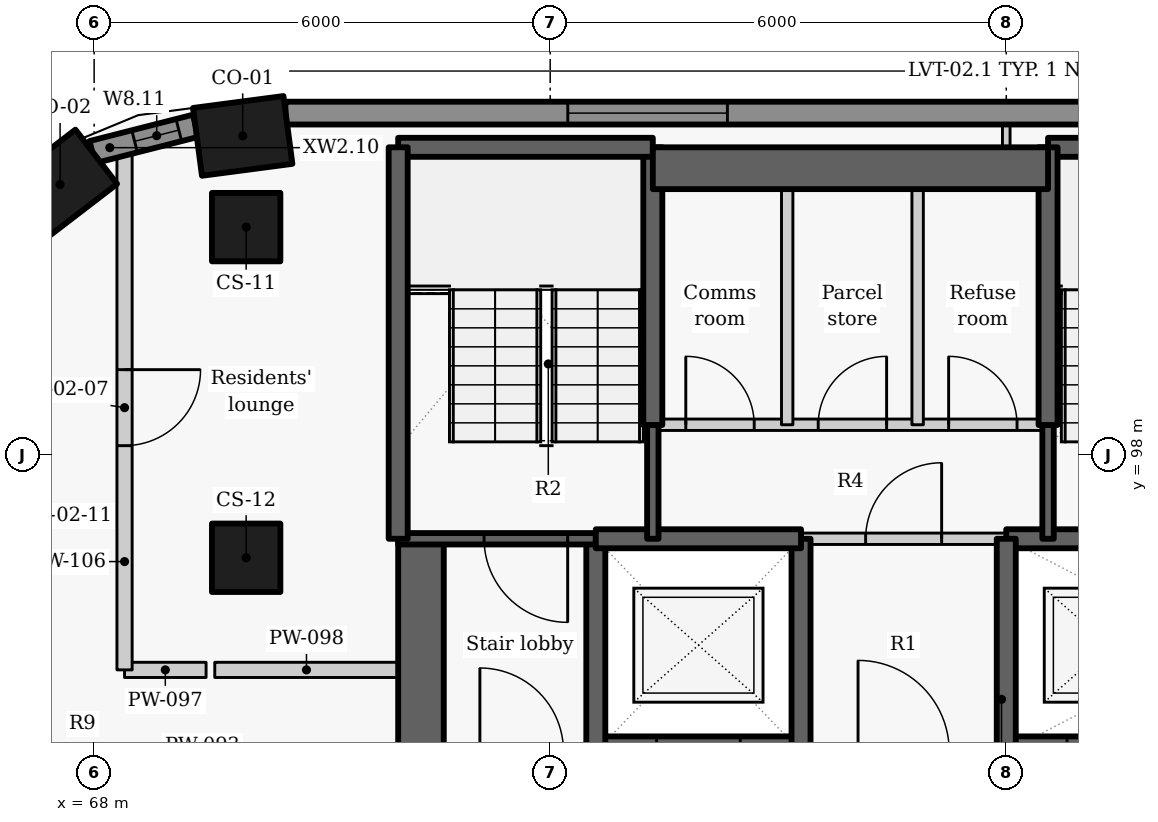
"""IFC4 building model, lengths in metres.
Left out: names, types, materials, properties, quantities, classifications, styles, units other than length and angle.
Written with IfcOpenShell. Run it as: python <this file> out.ifc"""

import sys

from ifc_helpers import new_model, si_unit, direction, frame, frame_2d, origin, origin_2d, place, context, subcontext, project, spatial, rectangle, extrude, element, fill, save


model = new_model("IFC4")
c1 = context("Model", 3, precision=1e-05, world=origin(), true_north=direction((0.0, 1.0)))
c2 = subcontext(c1, "Body", "Model", "MODEL_VIEW")
j1 = project(units=[si_unit("LENGTHUNIT", "METRE"), si_unit("PLANEANGLEUNIT", "RADIAN")], contexts=[c1])
p1 = place(None, origin())
s1 = spatial("IfcSite", under=j1, at=p1, CompositionType="ELEMENT")
p2 = place(p1, origin())
s2 = spatial("IfcBuilding", under=s1, at=p2, CompositionType="ELEMENT")
p3 = place(p2, frame((0.0, 0.0, 203.1)))
s3 = spatial("IfcBuildingStorey", under=s2, at=p3, CompositionType="ELEMENT", Elevation=203.1)
for number, where, z_axis, x_axis in (
    (1, (69.955, 102.2, 0.0), (0.0, 0.0, 1.0), (-0.991, -0.131, 0.0)),
    (2, (67.552, 101.56, 0.0), (0.0, 0.0, 1.0), (-0.793, -0.609, 0.0)),
):
    element("IfcColumn", number, at=place(p3, frame(where, z_axis=z_axis, x_axis=x_axis)), inside=s3, PredefinedType="COLUMN", context=c2, shape_type="SweptSolid", body=[
        extrude(rectangle(XDim=1.2, YDim=0.9, at=origin_2d()), origin(), (0.0, 0.0, 1.0), 3.3),
    ])
for number, where, z_axis, x_axis in (
    (3, (70.0, 101.0, 0.0), (0.0, 0.0, 1.0), (0.0, -1.0, 0.0)),
    (4, (70.0, 96.65, 0.0), (0.0, 0.0, 1.0), (0.0, -1.0, 0.0)),
):
    element("IfcColumn", number, at=place(p3, frame(where, z_axis=z_axis, x_axis=x_axis)), inside=s3, PredefinedType="COLUMN", context=c2, shape_type="SweptSolid", body=[
        extrude(rectangle(XDim=0.9, YDim=0.9, at=origin_2d()), origin(), (0.0, 0.0, 1.0), 3.3),
    ])
p4 = place(p3, frame((89.449, 102.5, 0.0), z_axis=(0.0, 0.0, 1.0), x_axis=(-1.0, 0.0, 0.0)))
e5 = element("IfcWall", 5, at=p4, inside=s3, PredefinedType="SOLIDWALL", context=c2, shape_type="SweptSolid", body=[
    extrude(rectangle(XDim=18.933, YDim=0.3, at=frame_2d((9.466, 0.0))), origin(), (0.0, 0.0, 1.0), 2.425),
])
p5 = place(p4, frame((3.687, 0.0, 0.9)))
e6 = element("IfcOpeningElement", 6, at=p5, cuts=e5, PredefinedType="OPENING", context=c2, shape_type="SweptSolid", body=[
    extrude(rectangle(XDim=2.1, YDim=1.1, at=frame_2d((1.05, 0.55))), frame((0.0, 0.16, 0.0), z_axis=(0.0, -1.0, 0.0), x_axis=(1.0, 0.0, 0.0)), (0.0, 0.0, 1.0), 0.32),
])
p6 = place(p4, frame((13.118, 0.0, 0.9)))
e7 = element("IfcOpeningElement", 7, at=p6, cuts=e5, PredefinedType="OPENING", context=c2, shape_type="SweptSolid", body=[
    extrude(rectangle(XDim=2.1, YDim=1.1, at=frame_2d((1.05, 0.55))), frame((0.0, 0.16, 0.0), z_axis=(0.0, -1.0, 0.0), x_axis=(1.0, 0.0, 0.0)), (0.0, 0.0, 1.0), 0.32),
])
p7 = place(p3, frame((69.336, 102.333, 0.0), z_axis=(0.0, 0.0, 1.0), x_axis=(-0.969037396898, -0.246914000036, 0.0)))
e8 = element("IfcWall", 8, at=p7, inside=s3, PredefinedType="SOLIDWALL", context=c2, shape_type="SweptSolid", body=[
    extrude(rectangle(XDim=1.403, YDim=0.3, at=frame_2d((0.702, 0.0))), origin(), (0.0, 0.0, 1.0), 2.425),
])
p8 = place(p7, frame((0.229, 0.0, 0.9)))
e9 = element("IfcOpeningElement", 9, at=p8, cuts=e8, PredefinedType="OPENING", context=c2, shape_type="SweptSolid", body=[
    extrude(rectangle(XDim=0.6, YDim=1.1, at=frame_2d((0.3, 0.55))), frame((0.0, 0.16, 0.0), z_axis=(0.0, -1.0, 0.0), x_axis=(1.0, 0.0, 0.0)), (0.0, 0.0, 1.0), 0.32),
])
p9 = place(p3, frame((72.3, 87.8, -0.275), z_axis=(0.0, 0.0, 1.0), x_axis=(0.0, 1.0, 0.0)))
e10 = element("IfcWall", 10, at=p9, inside=s3, PredefinedType="SHEAR", context=c2, shape_type="SweptSolid", body=[
    extrude(rectangle(XDim=9.1, YDim=0.6, at=frame_2d((4.55, 0.0))), origin(), (0.0, 0.0, 1.0), 3.3),
])
p10 = place(p9, frame((3.852, 0.0, 0.275)))
e11 = element("IfcOpeningElement", 11, at=p10, cuts=e10, PredefinedType="OPENING", context=c2, shape_type="SweptSolid", body=[
    extrude(rectangle(XDim=1.5, YDim=2.1, at=frame_2d((0.75, 1.05))), frame((0.0, 0.31, 0.0), z_axis=(0.0, -1.0, 0.0), x_axis=(1.0, 0.0, 0.0)), (0.0, 0.0, 1.0), 0.62),
])
p11 = place(p3, frame((74.597, 94.1, -0.275), z_axis=(0.0, 0.0, 1.0), x_axis=(1.0, 0.0, 0.0)))
e12 = element("IfcWall", 12, at=p11, inside=s3, PredefinedType="SHEAR", context=c2, shape_type="SweptSolid", body=[
    extrude(rectangle(XDim=2.706, YDim=0.4, at=frame_2d((1.353, 0.0))), origin(), (0.0, 0.0, 1.0), 3.3),
])
p12 = place(p11, frame((0.803, 0.0, 0.275)))
e13 = element("IfcOpeningElement", 13, at=p12, cuts=e12, PredefinedType="OPENING", context=c2, shape_type="SweptSolid", body=[
    extrude(rectangle(XDim=1.1, YDim=2.1, at=frame_2d((0.55, 1.05))), frame((0.0, 0.21, 0.0), z_axis=(0.0, -1.0, 0.0), x_axis=(1.0, 0.0, 0.0)), (0.0, 0.0, 1.0), 0.42),
])
p13 = place(p3, frame((79.997, 94.1, -0.275), z_axis=(0.0, 0.0, 1.0), x_axis=(1.0, 0.0, 0.0)))
e14 = element("IfcWall", 14, at=p13, inside=s3, PredefinedType="SHEAR", context=c2, shape_type="SweptSolid", body=[
    extrude(rectangle(XDim=5.406, YDim=0.4, at=frame_2d((2.703, 0.0))), origin(), (0.0, 0.0, 1.0), 3.3),
])
p14 = place(p13, frame((0.803, 0.0, 0.275)))
e15 = element("IfcOpeningElement", 15, at=p14, cuts=e14, PredefinedType="OPENING", context=c2, shape_type="SweptSolid", body=[
    extrude(rectangle(XDim=1.1, YDim=2.1, at=frame_2d((0.55, 1.05))), frame((0.0, 0.21, 0.0), z_axis=(0.0, -1.0, 0.0), x_axis=(1.0, 0.0, 0.0)), (0.0, 0.0, 1.0), 0.42),
])
p15 = place(p3, frame((74.6, 94.1, -0.275), z_axis=(0.0, 0.0, 1.0), x_axis=(0.0, 1.0, 0.0)))
e16 = element("IfcWall", 16, at=p15, inside=s3, PredefinedType="SHEAR", context=c2, shape_type="SweptSolid", body=[
    extrude(rectangle(XDim=2.8, YDim=0.25, at=frame_2d((1.4, 0.0))), origin(), (0.0, 0.0, 1.0), 3.3),
])
p16 = place(p3, frame((74.6, 96.9, -0.275), z_axis=(0.0, 0.0, 1.0), x_axis=(-1.0, 0.0, 0.0)))
e17 = element("IfcWall", 17, at=p16, inside=s3, PredefinedType="SHEAR", context=c2, shape_type="SweptSolid", body=[
    extrude(rectangle(XDim=2.6, YDim=0.15, at=frame_2d((1.3, 0.0))), origin(), (0.0, 0.0, 1.0), 3.3),
])
p17 = place(p16, frame((0.37, 0.0, 0.275)))
e18 = element("IfcOpeningElement", 18, at=p17, cuts=e17, PredefinedType="OPENING", context=c2, shape_type="SweptSolid", body=[
    extrude(rectangle(XDim=1.1, YDim=2.1, at=frame_2d((0.55, 1.05))), frame((0.0, 0.085, 0.0), z_axis=(0.0, -1.0, 0.0), x_axis=(1.0, 0.0, 0.0)), (0.0, 0.0, 1.0), 0.17),
])
p18 = place(p3, frame((77.3, 94.1, -0.275), z_axis=(0.0, 0.0, 1.0), x_axis=(0.0, 1.0, 0.0)))
e19 = element("IfcWall", 19, at=p18, inside=s3, PredefinedType="SHEAR", context=c2, shape_type="SweptSolid", body=[
    extrude(rectangle(XDim=2.8, YDim=0.25, at=frame_2d((1.4, 0.0))), origin(), (0.0, 0.0, 1.0), 3.3),
])
p19 = place(p3, frame((74.6, 96.9, -0.275), z_axis=(0.0, 0.0, 1.0), x_axis=(1.0, 0.0, 0.0)))
e20 = element("IfcWall", 20, at=p19, inside=s3, PredefinedType="SHEAR", context=c2, shape_type="SweptSolid", body=[
    extrude(rectangle(XDim=2.7, YDim=0.25, at=frame_2d((1.35, 0.0))), origin(), (0.0, 0.0, 1.0), 3.3),
])
p20 = place(p3, frame((80.0, 96.9, -0.275), z_axis=(0.0, 0.0, 1.0), x_axis=(1.0, 0.0, 0.0)))
e21 = element("IfcWall", 21, at=p20, inside=s3, PredefinedType="SHEAR", context=c2, shape_type="SweptSolid", body=[
    extrude(rectangle(XDim=8.0, YDim=0.25, at=frame_2d((4.0, 0.0))), origin(), (0.0, 0.0, 1.0), 3.3),
])
p21 = place(p20, frame((3.849, 0.0, 0.275)))
e22 = element("IfcOpeningElement", 22, at=p21, cuts=e21, PredefinedType="OPENING", context=c2, shape_type="SweptSolid", body=[
    extrude(rectangle(XDim=1.1, YDim=2.1, at=frame_2d((0.55, 1.05))), frame((0.0, 0.135, 0.0), z_axis=(0.0, -1.0, 0.0), x_axis=(1.0, 0.0, 0.0)), (0.0, 0.0, 1.0), 0.27),
])
p22 = place(p3, frame((80.0, 94.1, -0.275), z_axis=(0.0, 0.0, 1.0), x_axis=(0.0, 1.0, 0.0)))
e23 = element("IfcWall", 23, at=p22, inside=s3, PredefinedType="SHEAR", context=c2, shape_type="SweptSolid", body=[
    extrude(rectangle(XDim=2.8, YDim=0.25, at=frame_2d((1.4, 0.0))), origin(), (0.0, 0.0, 1.0), 3.3),
])
p23 = place(p3, frame((77.3, 96.9, 0.0), z_axis=(0.0, 0.0, 1.0), x_axis=(1.0, 0.0, 0.0)))
e24 = element("IfcWall", 24, at=p23, inside=s3, PredefinedType="PARTITIONING", context=c2, shape_type="SweptSolid", body=[
    extrude(rectangle(XDim=2.7, YDim=0.15, at=frame_2d((1.35, 0.0))), origin(), (0.0, 0.0, 1.0), 3.025),
])
p24 = place(p23, frame((0.85, 0.0, 0.0)))
e25 = element("IfcOpeningElement", 25, at=p24, cuts=e24, PredefinedType="OPENING", context=c2, shape_type="SweptSolid", body=[
    extrude(rectangle(XDim=1.0, YDim=2.1, at=frame_2d((0.5, 1.05))), frame((0.0, 0.085, 0.0), z_axis=(0.0, -1.0, 0.0), x_axis=(1.0, 0.0, 0.0)), (0.0, 0.0, 1.0), 0.17),
])
p25 = place(p3, frame((75.35, 96.9, -0.275), z_axis=(0.0, 0.0, 1.0), x_axis=(0.0, 1.0, 0.0)))
e26 = element("IfcWall", 26, at=p25, inside=s3, PredefinedType="SHEAR", context=c2, shape_type="SweptSolid", body=[
    extrude(rectangle(XDim=1.503, YDim=0.15, at=frame_2d((0.751, 0.0))), origin(), (0.0, 0.0, 1.0), 3.3),
])
p26 = place(p3, frame((75.35, 98.397, -0.275), z_axis=(0.0, 0.0, 1.0), x_axis=(0.0, 1.0, 0.0)))
e27 = element("IfcWall", 27, at=p26, inside=s3, PredefinedType="SHEAR", context=c2, shape_type="SweptSolid", body=[
    extrude(rectangle(XDim=3.653, YDim=0.25, at=frame_2d((1.827, 0.0))), origin(), (0.0, 0.0, 1.0), 3.3),
])
p27 = place(p3, frame((72.0, 102.05, -0.275), z_axis=(0.0, 0.0, 1.0), x_axis=(1.0, 0.0, 0.0)))
e28 = element("IfcWall", 28, at=p27, inside=s3, PredefinedType="SHEAR", context=c2, shape_type="SweptSolid", body=[
    extrude(rectangle(XDim=3.35, YDim=0.25, at=frame_2d((1.675, 0.0))), origin(), (0.0, 0.0, 1.0), 3.3),
])
p28 = place(p3, frame((80.55, 102.05, -0.275), z_axis=(0.0, 0.0, 1.0), x_axis=(1.0, 0.0, 0.0)))
e29 = element("IfcWall", 29, at=p28, inside=s3, PredefinedType="SHEAR", context=c2, shape_type="SweptSolid", body=[
    extrude(rectangle(XDim=2.85, YDim=0.25, at=frame_2d((1.425, 0.0))), origin(), (0.0, 0.0, 1.0), 3.3),
])
p29 = place(p3, frame((72.0, 96.9, -0.275), z_axis=(0.0, 0.0, 1.0), x_axis=(0.0, 1.0, 0.0)))
e30 = element("IfcWall", 30, at=p29, inside=s3, PredefinedType="SHEAR", context=c2, shape_type="SweptSolid", body=[
    extrude(rectangle(XDim=5.15, YDim=0.25, at=frame_2d((2.575, 0.0))), origin(), (0.0, 0.0, 1.0), 3.3),
])
p30 = place(p3, frame((80.55, 96.9, -0.275), z_axis=(0.0, 0.0, 1.0), x_axis=(0.0, 1.0, 0.0)))
e31 = element("IfcWall", 31, at=p30, inside=s3, PredefinedType="SHEAR", context=c2, shape_type="SweptSolid", body=[
    extrude(rectangle(XDim=1.503, YDim=0.15, at=frame_2d((0.751, 0.0))), origin(), (0.0, 0.0, 1.0), 3.3),
])
p31 = place(p3, frame((80.55, 98.397, -0.275), z_axis=(0.0, 0.0, 1.0), x_axis=(0.0, 1.0, 0.0)))
e32 = element("IfcWall", 32, at=p31, inside=s3, PredefinedType="SHEAR", context=c2, shape_type="SweptSolid", body=[
    extrude(rectangle(XDim=3.653, YDim=0.25, at=frame_2d((1.827, 0.0))), origin(), (0.0, 0.0, 1.0), 3.3),
])
p32 = place(p3, frame((75.35, 101.775, -0.275), z_axis=(0.0, 0.0, 1.0), x_axis=(1.0, 0.0, 0.0)))
e33 = element("IfcWall", 33, at=p32, inside=s3, PredefinedType="SHEAR", context=c2, shape_type="SweptSolid", body=[
    extrude(rectangle(XDim=5.2, YDim=0.55, at=frame_2d((2.6, 0.0))), origin(), (0.0, 0.0, 1.0), 3.3),
])
p33 = place(p3, frame((75.35, 98.4, 0.0), z_axis=(0.0, 0.0, 1.0), x_axis=(1.0, 0.0, 0.0)))
e34 = element("IfcWall", 34, at=p33, inside=s3, PredefinedType="PARTITIONING", context=c2, shape_type="SweptSolid", body=[
    extrude(rectangle(XDim=5.2, YDim=0.15, at=frame_2d((2.6, 0.0))), origin(), (0.0, 0.0, 1.0), 3.025),
])
p34 = place(p33, frame((0.434, 0.0, 0.0)))
e35 = element("IfcOpeningElement", 35, at=p34, cuts=e34, PredefinedType="OPENING", context=c2, shape_type="SweptSolid", body=[
    extrude(rectangle(XDim=0.9, YDim=2.1, at=frame_2d((0.45, 1.05))), frame((0.0, 0.085, 0.0), z_axis=(0.0, -1.0, 0.0), x_axis=(1.0, 0.0, 0.0)), (0.0, 0.0, 1.0), 0.17),
])
p35 = place(p33, frame((2.176, 0.0, 0.0)))
e36 = element("IfcOpeningElement", 36, at=p35, cuts=e34, PredefinedType="OPENING", context=c2, shape_type="SweptSolid", body=[
    extrude(rectangle(XDim=0.9, YDim=2.1, at=frame_2d((0.45, 1.05))), frame((0.0, 0.085, 0.0), z_axis=(0.0, -1.0, 0.0), x_axis=(1.0, 0.0, 0.0)), (0.0, 0.0, 1.0), 0.17),
])
p36 = place(p33, frame((3.892, 0.0, 0.0)))
e37 = element("IfcOpeningElement", 37, at=p36, cuts=e34, PredefinedType="OPENING", context=c2, shape_type="SweptSolid", body=[
    extrude(rectangle(XDim=0.9, YDim=2.1, at=frame_2d((0.45, 1.05))), frame((0.0, 0.085, 0.0), z_axis=(0.0, -1.0, 0.0), x_axis=(1.0, 0.0, 0.0)), (0.0, 0.0, 1.0), 0.17),
])
for number, where, z_axis, x_axis in (
    (38, (77.118, 98.4, 0.0), (0.0, 0.0, 1.0), (0.0, 1.0, 0.0)),
    (39, (78.834, 98.4, 0.0), (0.0, 0.0, 1.0), (0.0, 1.0, 0.0)),
):
    element("IfcWall", number, at=place(p3, frame(where, z_axis=z_axis, x_axis=x_axis)), inside=s3, PredefinedType="PARTITIONING", context=c2, shape_type="SweptSolid", body=[
        extrude(rectangle(XDim=3.65, YDim=0.15, at=frame_2d((1.825, 0.0))), origin(), (0.0, 0.0, 1.0), 3.025),
    ])
p37 = place(p3, frame((68.4, 95.175, 0.0), z_axis=(0.0, 0.0, 1.0), x_axis=(1.0, 0.0, 0.0)))
e40 = element("IfcWall", 40, at=p37, inside=s3, PredefinedType="PARTITIONING", context=c2, shape_type="SweptSolid", body=[
    extrude(rectangle(XDim=1.073, YDim=0.2, at=frame_2d((0.537, 0.0))), origin(), (0.0, 0.0, 1.0), 3.025),
])
p38 = place(p3, frame((69.587, 95.175, 0.0), z_axis=(0.0, 0.0, 1.0), x_axis=(1.0, 0.0, 0.0)))
e41 = element("IfcWall", 41, at=p38, inside=s3, PredefinedType="PARTITIONING", context=c2, shape_type="SweptSolid", body=[
    extrude(rectangle(XDim=2.413, YDim=0.2, at=frame_2d((1.207, 0.0))), origin(), (0.0, 0.0, 1.0), 2.505),
])
p39 = place(p3, frame((68.4, 102.074, 0.0), z_axis=(0.0, 0.0, 1.0), x_axis=(0.0, -1.0, 0.0)))
e42 = element("IfcWall", 42, at=p39, inside=s3, PredefinedType="PARTITIONING", context=c2, shape_type="SweptSolid", body=[
    extrude(rectangle(XDim=6.899, YDim=0.2, at=frame_2d((3.449, 0.0))), origin(), (0.0, 0.0, 1.0), 2.405),
])
p40 = place(p39, frame((2.949, 0.0, 0.0)))
e43 = element("IfcOpeningElement", 43, at=p40, cuts=e42, PredefinedType="OPENING", context=c2, shape_type="SweptSolid", body=[
    extrude(rectangle(XDim=1.0, YDim=2.1, at=frame_2d((0.5, 1.05))), frame((0.0, 0.11, 0.0), z_axis=(0.0, -1.0, 0.0), x_axis=(1.0, 0.0, 0.0)), (0.0, 0.0, 1.0), 0.22),
])
p41 = place(p3, frame((80.0, 102.05, 0.0), z_axis=(0.0, 0.0, 1.0), x_axis=(0.0, 1.0, 0.0)))
e44 = element("IfcWall", 44, at=p41, inside=s3, PredefinedType="PARTITIONING", context=c2, shape_type="SweptSolid", body=[
    extrude(rectangle(XDim=0.3, YDim=0.1, at=frame_2d((0.15, 0.0))), origin(), (0.0, 0.0, 1.0), 3.025),
])
p42 = place(p6, origin())
e45 = element("IfcWindow", 45, at=p42, inside=s3, PartitioningType="SINGLE_PANEL", PredefinedType="WINDOW", context=c2, shape_type="SweptSolid", body=[
    extrude(rectangle(XDim=2.1, YDim=1.1, at=frame_2d((1.05, 0.55))), frame((0.0, 0.03, 0.0), z_axis=(0.0, -1.0, 0.0), x_axis=(1.0, 0.0, 0.0)), (0.0, 0.0, 1.0), 0.06),
])
fill(e7, e45)
p43 = place(p8, origin())
e46 = element("IfcWindow", 46, at=p43, inside=s3, PartitioningType="SINGLE_PANEL", PredefinedType="WINDOW", context=c2, shape_type="SweptSolid", body=[
    extrude(rectangle(XDim=0.6, YDim=1.1, at=frame_2d((0.3, 0.55))), frame((0.0, 0.03, 0.0), z_axis=(0.0, -1.0, 0.0), x_axis=(1.0, 0.0, 0.0)), (0.0, 0.0, 1.0), 0.06),
])
fill(e9, e46)
p44 = place(p24, origin())
e47 = element("IfcDoor", 47, at=p44, inside=s3, OperationType="SINGLE_SWING_RIGHT", PredefinedType="DOOR", context=c2, shape_type="SweptSolid", body=[
    extrude(rectangle(XDim=1.0, YDim=2.1, at=frame_2d((0.5, 1.05))), frame((0.0, 0.025, 0.0), z_axis=(0.0, -1.0, 0.0), x_axis=(1.0, 0.0, 0.0)), (0.0, 0.0, 1.0), 0.05),
])
fill(e25, e47)
p45 = place(p34, origin())
e48 = element("IfcDoor", 48, at=p45, inside=s3, OperationType="SINGLE_SWING_LEFT", PredefinedType="DOOR", context=c2, shape_type="SweptSolid", body=[
    extrude(rectangle(XDim=0.9, YDim=2.1, at=frame_2d((0.45, 1.05))), frame((0.0, 0.025, 0.0), z_axis=(0.0, -1.0, 0.0), x_axis=(1.0, 0.0, 0.0)), (0.0, 0.0, 1.0), 0.05),
])
fill(e35, e48)
p46 = place(p35, origin())
e49 = element("IfcDoor", 49, at=p46, inside=s3, OperationType="SINGLE_SWING_RIGHT", PredefinedType="DOOR", context=c2, shape_type="SweptSolid", body=[
    extrude(rectangle(XDim=0.9, YDim=2.1, at=frame_2d((0.45, 1.05))), frame((0.0, 0.025, 0.0), z_axis=(0.0, -1.0, 0.0), x_axis=(1.0, 0.0, 0.0)), (0.0, 0.0, 1.0), 0.05),
])
fill(e36, e49)
p47 = place(p36, origin())
e50 = element("IfcDoor", 50, at=p47, inside=s3, OperationType="SINGLE_SWING_LEFT", PredefinedType="DOOR", context=c2, shape_type="SweptSolid", body=[
    extrude(rectangle(XDim=0.9, YDim=2.1, at=frame_2d((0.45, 1.05))), frame((0.0, 0.025, 0.0), z_axis=(0.0, -1.0, 0.0), x_axis=(1.0, 0.0, 0.0)), (0.0, 0.0, 1.0), 0.05),
])
fill(e37, e50)
p48 = place(p17, origin())
e51 = element("IfcDoor", 51, at=p48, inside=s3, OperationType="SINGLE_SWING_LEFT", PredefinedType="DOOR", context=c2, shape_type="SweptSolid", body=[
    extrude(rectangle(XDim=1.1, YDim=2.1, at=frame_2d((0.55, 1.05))), frame((0.0, 0.025, 0.0), z_axis=(0.0, -1.0, 0.0), x_axis=(1.0, 0.0, 0.0)), (0.0, 0.0, 1.0), 0.05),
])
fill(e18, e51)
p49 = place(p40, origin())
e52 = element("IfcDoor", 52, at=p49, inside=s3, OperationType="SINGLE_SWING_LEFT", PredefinedType="DOOR", context=c2, shape_type="SweptSolid", body=[
    extrude(rectangle(XDim=1.0, YDim=2.1, at=frame_2d((0.5, 1.05))), frame((0.0, 0.025, 0.0), z_axis=(0.0, -1.0, 0.0), x_axis=(1.0, 0.0, 0.0)), (0.0, 0.0, 1.0), 0.05),
])
fill(e43, e52)
save(model, sys.argv[1])
